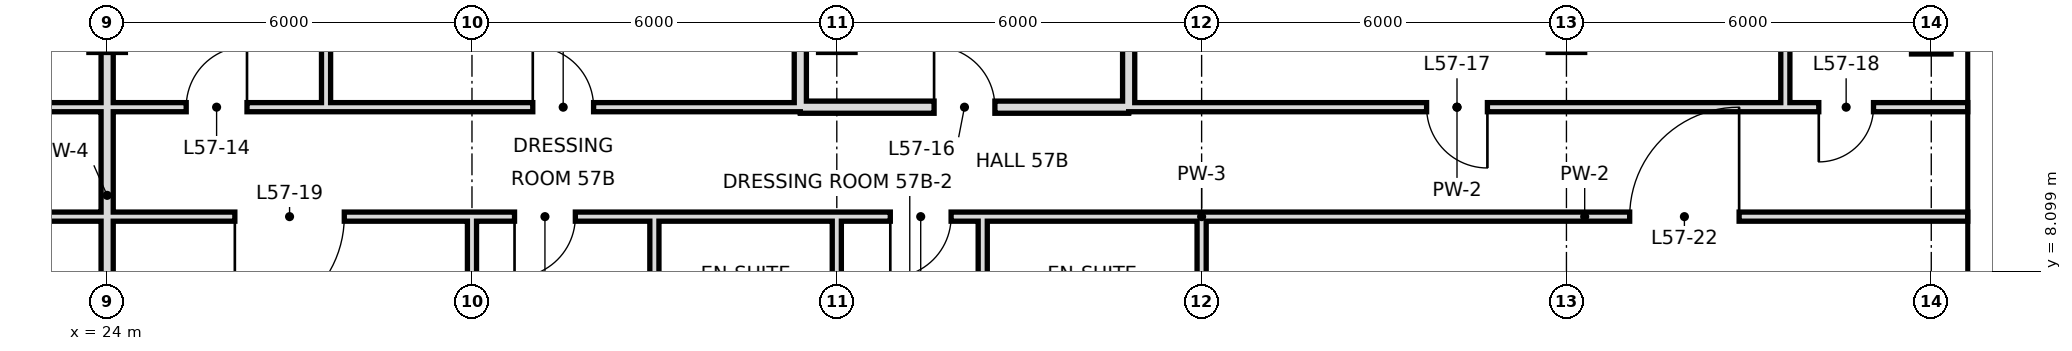
"""IFC4 building model, lengths in metres.
Left out: names, types, materials, properties, quantities, classifications, styles, units other than length and angle.
Written with IfcOpenShell. Run it as: python <this file> out.ifc"""

import sys

from ifc_helpers import new_model, si_unit, direction, frame, frame_2d, origin, origin_2d, place, context, subcontext, project, spatial, rectangle, hollow_rectangle, extrude, element, fill, save


model = new_model("IFC4")
c1 = context("Model", 3, precision=1e-05, world=origin(), true_north=direction((0.0, 1.0)))
c2 = subcontext(c1, "Body", "Model", "MODEL_VIEW")
j1 = project(units=[si_unit("LENGTHUNIT", "METRE"), si_unit("PLANEANGLEUNIT", "RADIAN")], contexts=[c1])
p1 = place(None, origin())
s1 = spatial("IfcSite", under=j1, at=p1, CompositionType="ELEMENT")
p2 = place(p1, origin())
s2 = spatial("IfcBuilding", under=s1, at=p2, CompositionType="ELEMENT")
p3 = place(p2, frame((0.0, 0.0, 243.2)))
s3 = spatial("IfcBuildingStorey", under=s2, at=p3, CompositionType="ELEMENT", Elevation=243.2)
p4 = place(p3, frame((54.0, 12.0, 0.0), z_axis=(0.0, 0.0, 1.0), x_axis=(1.0, 0.0, 0.0)))
e1 = element("IfcColumn", 1, at=p4, inside=s3, PredefinedType="COLUMN", context=c2, shape_type="SweptSolid", body=[
    extrude(hollow_rectangle(XDim=0.65, YDim=0.65, WallThickness=0.032, at=origin_2d()), origin(), (0.0, 0.0, 1.0), 3.6),
])
p5 = place(p3, frame((24.0, 0.0, 0.0), z_axis=(0.0, 0.0, 1.0), x_axis=(0.0, 1.0, 0.0)))
e2 = element("IfcWall", 2, at=p5, inside=s3, PredefinedType="SOLIDWALL", context=c2, shape_type="SweptSolid", body=[
    extrude(rectangle(XDim=18.7, YDim=0.2, at=frame_2d((9.35, 0.0))), origin(), (0.0, 0.0, 1.0), 2.72),
])
p6 = place(p3, frame((27.6, 10.8, 0.0), z_axis=(0.0, 0.0, 1.0), x_axis=(0.0, 1.0, 0.0)))
e3 = element("IfcWall", 3, at=p6, inside=s3, PredefinedType="PARTITIONING", context=c2, shape_type="SweptSolid", body=[
    extrude(rectangle(XDim=7.9, YDim=0.15, at=frame_2d((3.95, 0.0))), origin(), (0.0, 0.0, 1.0), 3.42),
])
p7 = place(p3, frame((30.0, -0.6, 0.0), z_axis=(0.0, 0.0, 1.0), x_axis=(0.0, 1.0, 0.0)))
e4 = element("IfcWall", 4, at=p7, inside=s3, PredefinedType="PARTITIONING", context=c2, shape_type="SweptSolid", body=[
    extrude(rectangle(XDim=9.6, YDim=0.15, at=frame_2d((4.8, 0.0))), origin(), (0.0, 0.0, 1.0), 2.72),
])
p8 = place(p3, frame((33.0, 6.0, 0.0), z_axis=(0.0, 0.0, 1.0), x_axis=(0.0, 1.0, 0.0)))
e5 = element("IfcWall", 5, at=p8, inside=s3, PredefinedType="PARTITIONING", context=c2, shape_type="SweptSolid", body=[
    extrude(rectangle(XDim=3.0, YDim=0.15, at=frame_2d((1.5, 0.0))), origin(), (0.0, 0.0, 1.0), 3.42),
])
p9 = place(p3, frame((35.4, 10.8, 0.0), z_axis=(0.0, 0.0, 1.0), x_axis=(0.0, 1.0, 0.0)))
e6 = element("IfcWall", 6, at=p9, inside=s3, PredefinedType="SOLIDWALL", context=c2, shape_type="SweptSolid", body=[
    extrude(rectangle(XDim=7.9, YDim=0.2, at=frame_2d((3.95, 0.0))), origin(), (0.0, 0.0, 1.0), 2.72),
])
p10 = place(p3, frame((36.0, 6.0, 0.0), z_axis=(0.0, 0.0, 1.0), x_axis=(0.0, 1.0, 0.0)))
e7 = element("IfcWall", 7, at=p10, inside=s3, PredefinedType="PARTITIONING", context=c2, shape_type="SweptSolid", body=[
    extrude(rectangle(XDim=3.0, YDim=0.15, at=frame_2d((1.5, 0.0))), origin(), (0.0, 0.0, 1.0), 2.72),
])
p11 = place(p3, frame((38.4, 6.0, 0.0), z_axis=(0.0, 0.0, 1.0), x_axis=(0.0, 1.0, 0.0)))
e8 = element("IfcWall", 8, at=p11, inside=s3, PredefinedType="PARTITIONING", context=c2, shape_type="SweptSolid", body=[
    extrude(rectangle(XDim=3.0, YDim=0.15, at=frame_2d((1.5, 0.0))), origin(), (0.0, 0.0, 1.0), 3.42),
])
p12 = place(p3, frame((40.8, 10.8, 0.0), z_axis=(0.0, 0.0, 1.0), x_axis=(0.0, 1.0, 0.0)))
e9 = element("IfcWall", 9, at=p12, inside=s3, PredefinedType="SOLIDWALL", context=c2, shape_type="SweptSolid", body=[
    extrude(rectangle(XDim=7.9, YDim=0.2, at=frame_2d((3.95, 0.0))), origin(), (0.0, 0.0, 1.0), 2.72),
])
p13 = place(p3, frame((42.0, 6.0, 0.0), z_axis=(0.0, 0.0, 1.0), x_axis=(0.0, 1.0, 0.0)))
e10 = element("IfcWall", 10, at=p13, inside=s3, PredefinedType="PARTITIONING", context=c2, shape_type="SweptSolid", body=[
    extrude(rectangle(XDim=3.0, YDim=0.15, at=frame_2d((1.5, 0.0))), origin(), (0.0, 0.0, 1.0), 2.72),
])
p14 = place(p3, frame((51.6, 10.8, 0.0), z_axis=(0.0, 0.0, 1.0), x_axis=(0.0, 1.0, 0.0)))
e11 = element("IfcWall", 11, at=p14, inside=s3, PredefinedType="PARTITIONING", context=c2, shape_type="SweptSolid", body=[
    extrude(rectangle(XDim=7.2, YDim=0.15, at=frame_2d((3.6, 0.0))), origin(), (0.0, 0.0, 1.0), 3.42),
])
p15 = place(p3, frame((35.4, 10.8, 0.0), z_axis=(0.0, 0.0, 1.0), x_axis=(1.0, 0.0, 0.0)))
e12 = element("IfcWall", 12, at=p15, inside=s3, PredefinedType="SOLIDWALL", context=c2, shape_type="SweptSolid", body=[
    extrude(rectangle(XDim=5.4, YDim=0.2, at=frame_2d((2.7, 0.0))), origin(), (0.0, 0.0, 1.0), 2.72),
])
p16 = place(p15, frame((2.2, 0.0, 0.0)))
e13 = element("IfcOpeningElement", 13, at=p16, cuts=e12, PredefinedType="OPENING", context=c2, shape_type="SweptSolid", body=[
    extrude(rectangle(XDim=1.0, YDim=2.4, at=frame_2d((0.5, 1.2))), frame((0.0, 0.11, 0.0), z_axis=(0.0, -1.0, 0.0), x_axis=(1.0, 0.0, 0.0)), (0.0, 0.0, 1.0), 0.22),
])
p17 = place(p3, frame((6.0, 10.8, 0.0), z_axis=(0.0, 0.0, 1.0), x_axis=(1.0, 0.0, 0.0)))
e14 = element("IfcWall", 14, at=p17, inside=s3, PredefinedType="PARTITIONING", context=c2, shape_type="SweptSolid", body=[
    extrude(rectangle(XDim=29.4, YDim=0.15, at=frame_2d((14.7, 0.0))), origin(), (0.0, 0.0, 1.0), 3.42),
])
p18 = place(p17, frame((3.4, 0.0, 0.0)))
e15 = element("IfcOpeningElement", 15, at=p18, cuts=e14, PredefinedType="OPENING", context=c2, shape_type="SweptSolid", body=[
    extrude(rectangle(XDim=1.0, YDim=2.4, at=frame_2d((0.5, 1.2))), frame((0.0, 0.085, 0.0), z_axis=(0.0, -1.0, 0.0), x_axis=(1.0, 0.0, 0.0)), (0.0, 0.0, 1.0), 0.17),
])
p19 = place(p17, frame((9.4, 0.0, 0.0)))
e16 = element("IfcOpeningElement", 16, at=p19, cuts=e14, PredefinedType="OPENING", context=c2, shape_type="SweptSolid", body=[
    extrude(rectangle(XDim=1.0, YDim=2.4, at=frame_2d((0.5, 1.2))), frame((0.0, 0.085, 0.0), z_axis=(0.0, -1.0, 0.0), x_axis=(1.0, 0.0, 0.0)), (0.0, 0.0, 1.0), 0.17),
])
p20 = place(p17, frame((19.3, 0.0, 0.0)))
e17 = element("IfcOpeningElement", 17, at=p20, cuts=e14, PredefinedType="OPENING", context=c2, shape_type="SweptSolid", body=[
    extrude(rectangle(XDim=1.0, YDim=2.4, at=frame_2d((0.5, 1.2))), frame((0.0, 0.085, 0.0), z_axis=(0.0, -1.0, 0.0), x_axis=(1.0, 0.0, 0.0)), (0.0, 0.0, 1.0), 0.17),
])
p21 = place(p17, frame((25.0, 0.0, 0.0)))
e18 = element("IfcOpeningElement", 18, at=p21, cuts=e14, PredefinedType="OPENING", context=c2, shape_type="SweptSolid", body=[
    extrude(rectangle(XDim=1.0, YDim=2.4, at=frame_2d((0.5, 1.2))), frame((0.0, 0.085, 0.0), z_axis=(0.0, -1.0, 0.0), x_axis=(1.0, 0.0, 0.0)), (0.0, 0.0, 1.0), 0.17),
])
p22 = place(p3, frame((40.8, 10.8, 0.0), z_axis=(0.0, 0.0, 1.0), x_axis=(1.0, 0.0, 0.0)))
e19 = element("IfcWall", 19, at=p22, inside=s3, PredefinedType="PARTITIONING", context=c2, shape_type="SweptSolid", body=[
    extrude(rectangle(XDim=10.8, YDim=0.15, at=frame_2d((5.4, 0.0))), origin(), (0.0, 0.0, 1.0), 3.42),
])
p23 = place(p22, frame((4.9, 0.0, 0.0)))
e20 = element("IfcOpeningElement", 20, at=p23, cuts=e19, PredefinedType="OPENING", context=c2, shape_type="SweptSolid", body=[
    extrude(rectangle(XDim=1.0, YDim=2.4, at=frame_2d((0.5, 1.2))), frame((0.0, 0.085, 0.0), z_axis=(0.0, -1.0, 0.0), x_axis=(1.0, 0.0, 0.0)), (0.0, 0.0, 1.0), 0.17),
])
p24 = place(p3, frame((51.6, 10.8, 0.0), z_axis=(0.0, 0.0, 1.0), x_axis=(1.0, 0.0, 0.0)))
e21 = element("IfcWall", 21, at=p24, inside=s3, PredefinedType="PARTITIONING", context=c2, shape_type="SweptSolid", body=[
    extrude(rectangle(XDim=3.0, YDim=0.15, at=frame_2d((1.5, 0.0))), origin(), (0.0, 0.0, 1.0), 3.42),
])
p25 = place(p24, frame((0.55, 0.0, 0.0)))
e22 = element("IfcOpeningElement", 22, at=p25, cuts=e21, PredefinedType="OPENING", context=c2, shape_type="SweptSolid", body=[
    extrude(rectangle(XDim=0.9, YDim=2.4, at=frame_2d((0.45, 1.2))), frame((0.0, 0.085, 0.0), z_axis=(0.0, -1.0, 0.0), x_axis=(1.0, 0.0, 0.0)), (0.0, 0.0, 1.0), 0.17),
])
p26 = place(p3, frame((0.0, 9.0, 0.0), z_axis=(0.0, 0.0, 1.0), x_axis=(1.0, 0.0, 0.0)))
e23 = element("IfcWall", 23, at=p26, inside=s3, PredefinedType="PARTITIONING", context=c2, shape_type="SweptSolid", body=[
    extrude(rectangle(XDim=33.0, YDim=0.15, at=frame_2d((16.5, 0.0))), origin(), (0.0, 0.0, 1.0), 3.42),
])
p27 = place(p26, frame((1.6, 0.0, 0.0)))
e24 = element("IfcOpeningElement", 24, at=p27, cuts=e23, PredefinedType="OPENING", context=c2, shape_type="SweptSolid", body=[
    extrude(rectangle(XDim=1.0, YDim=2.4, at=frame_2d((0.5, 1.2))), frame((0.0, 0.085, 0.0), z_axis=(0.0, -1.0, 0.0), x_axis=(1.0, 0.0, 0.0)), (0.0, 0.0, 1.0), 0.17),
])
p28 = place(p26, frame((9.4, 0.0, 0.0)))
e25 = element("IfcOpeningElement", 25, at=p28, cuts=e23, PredefinedType="OPENING", context=c2, shape_type="SweptSolid", body=[
    extrude(rectangle(XDim=1.0, YDim=2.4, at=frame_2d((0.5, 1.2))), frame((0.0, 0.085, 0.0), z_axis=(0.0, -1.0, 0.0), x_axis=(1.0, 0.0, 0.0)), (0.0, 0.0, 1.0), 0.17),
])
p29 = place(p26, frame((15.16, 0.0, 0.0)))
e26 = element("IfcOpeningElement", 26, at=p29, cuts=e23, PredefinedType="OPENING", context=c2, shape_type="SweptSolid", body=[
    extrude(rectangle(XDim=1.8, YDim=2.4, at=frame_2d((0.9, 1.2))), frame((0.0, 0.085, 0.0), z_axis=(0.0, -1.0, 0.0), x_axis=(1.0, 0.0, 0.0)), (0.0, 0.0, 1.0), 0.17),
])
p30 = place(p26, frame((26.1, 0.0, 0.0)))
e27 = element("IfcOpeningElement", 27, at=p30, cuts=e23, PredefinedType="OPENING", context=c2, shape_type="SweptSolid", body=[
    extrude(rectangle(XDim=1.8, YDim=2.4, at=frame_2d((0.9, 1.2))), frame((0.0, 0.085, 0.0), z_axis=(0.0, -1.0, 0.0), x_axis=(1.0, 0.0, 0.0)), (0.0, 0.0, 1.0), 0.17),
])
p31 = place(p26, frame((30.7, 0.0, 0.0)))
e28 = element("IfcOpeningElement", 28, at=p31, cuts=e23, PredefinedType="OPENING", context=c2, shape_type="SweptSolid", body=[
    extrude(rectangle(XDim=1.0, YDim=2.4, at=frame_2d((0.5, 1.2))), frame((0.0, 0.085, 0.0), z_axis=(0.0, -1.0, 0.0), x_axis=(1.0, 0.0, 0.0)), (0.0, 0.0, 1.0), 0.17),
])
p32 = place(p3, frame((36.0, 9.0, 0.0), z_axis=(0.0, 0.0, 1.0), x_axis=(1.0, 0.0, 0.0)))
e29 = element("IfcWall", 29, at=p32, inside=s3, PredefinedType="PARTITIONING", context=c2, shape_type="SweptSolid", body=[
    extrude(rectangle(XDim=2.4, YDim=0.15, at=frame_2d((1.2, 0.0))), origin(), (0.0, 0.0, 1.0), 3.42),
])
p33 = place(p32, frame((0.88, 0.0, 0.0)))
e30 = element("IfcOpeningElement", 30, at=p33, cuts=e29, PredefinedType="OPENING", context=c2, shape_type="SweptSolid", body=[
    extrude(rectangle(XDim=1.0, YDim=2.4, at=frame_2d((0.5, 1.2))), frame((0.0, 0.085, 0.0), z_axis=(0.0, -1.0, 0.0), x_axis=(1.0, 0.0, 0.0)), (0.0, 0.0, 1.0), 0.17),
])
p34 = place(p3, frame((42.0, 9.0, 0.0), z_axis=(0.0, 0.0, 1.0), x_axis=(1.0, 0.0, 0.0)))
e31 = element("IfcWall", 31, at=p34, inside=s3, PredefinedType="PARTITIONING", context=c2, shape_type="SweptSolid", body=[
    extrude(rectangle(XDim=12.6, YDim=0.15, at=frame_2d((6.3, 0.0))), origin(), (0.0, 0.0, 1.0), 3.42),
])
p35 = place(p34, frame((7.04, 0.0, 0.0)))
e32 = element("IfcOpeningElement", 32, at=p35, cuts=e31, PredefinedType="OPENING", context=c2, shape_type="SweptSolid", body=[
    extrude(rectangle(XDim=1.8, YDim=2.4, at=frame_2d((0.9, 1.2))), frame((0.0, 0.085, 0.0), z_axis=(0.0, -1.0, 0.0), x_axis=(1.0, 0.0, 0.0)), (0.0, 0.0, 1.0), 0.17),
])
p36 = place(p3, frame((33.0, 9.0, 0.0), z_axis=(0.0, 0.0, 1.0), x_axis=(1.0, 0.0, 0.0)))
e33 = element("IfcWall", 33, at=p36, inside=s3, PredefinedType="PARTITIONING", context=c2, shape_type="SweptSolid", body=[
    extrude(rectangle(XDim=3.0, YDim=0.15, at=frame_2d((1.5, 0.0))), origin(), (0.0, 0.0, 1.0), 3.42),
])
p37 = place(p3, frame((38.4, 9.0, 0.0), z_axis=(0.0, 0.0, 1.0), x_axis=(1.0, 0.0, 0.0)))
e34 = element("IfcWall", 34, at=p37, inside=s3, PredefinedType="PARTITIONING", context=c2, shape_type="SweptSolid", body=[
    extrude(rectangle(XDim=3.6, YDim=0.15, at=frame_2d((1.8, 0.0))), origin(), (0.0, 0.0, 1.0), 3.42),
])
p38 = place(p20, frame((1.0, 0.0, 0.0), z_axis=(0.0, 0.0, 1.0), x_axis=(-1.0, 0.0, 0.0)))
e35 = element("IfcDoor", 35, at=p38, inside=s3, OperationType="SINGLE_SWING_LEFT", PredefinedType="DOOR", context=c2, shape_type="SweptSolid", body=[
    extrude(rectangle(XDim=1.0, YDim=2.4, at=frame_2d((0.5, 1.2))), frame((0.0, 0.025, 0.0), z_axis=(0.0, -1.0, 0.0), x_axis=(1.0, 0.0, 0.0)), (0.0, 0.0, 1.0), 0.05),
])
fill(e17, e35)
p39 = place(p21, origin())
e36 = element("IfcDoor", 36, at=p39, inside=s3, OperationType="SINGLE_SWING_LEFT", PredefinedType="DOOR", context=c2, shape_type="SweptSolid", body=[
    extrude(rectangle(XDim=1.0, YDim=2.4, at=frame_2d((0.5, 1.2))), frame((0.0, 0.025, 0.0), z_axis=(0.0, -1.0, 0.0), x_axis=(1.0, 0.0, 0.0)), (0.0, 0.0, 1.0), 0.05),
])
fill(e18, e36)
p40 = place(p16, origin())
e37 = element("IfcDoor", 37, at=p40, inside=s3, OperationType="SINGLE_SWING_LEFT", PredefinedType="DOOR", context=c2, shape_type="SweptSolid", body=[
    extrude(rectangle(XDim=1.0, YDim=2.4, at=frame_2d((0.5, 1.2))), frame((0.0, 0.025, 0.0), z_axis=(0.0, -1.0, 0.0), x_axis=(1.0, 0.0, 0.0)), (0.0, 0.0, 1.0), 0.05),
])
fill(e13, e37)
p41 = place(p23, origin())
e38 = element("IfcDoor", 38, at=p41, inside=s3, OperationType="SINGLE_SWING_RIGHT", PredefinedType="DOOR", context=c2, shape_type="SweptSolid", body=[
    extrude(rectangle(XDim=1.0, YDim=2.4, at=frame_2d((0.5, 1.2))), frame((0.0, 0.025, 0.0), z_axis=(0.0, -1.0, 0.0), x_axis=(1.0, 0.0, 0.0)), (0.0, 0.0, 1.0), 0.05),
])
fill(e20, e38)
p42 = place(p25, frame((0.9, 0.0, 0.0), z_axis=(0.0, 0.0, 1.0), x_axis=(-1.0, 0.0, 0.0)))
e39 = element("IfcDoor", 39, at=p42, inside=s3, OperationType="SINGLE_SWING_RIGHT", PredefinedType="DOOR", context=c2, shape_type="SweptSolid", body=[
    extrude(rectangle(XDim=0.9, YDim=2.4, at=frame_2d((0.45, 1.2))), frame((0.0, 0.025, 0.0), z_axis=(0.0, -1.0, 0.0), x_axis=(1.0, 0.0, 0.0)), (0.0, 0.0, 1.0), 0.05),
])
fill(e22, e39)
p43 = place(p30, frame((1.8, 0.0, 0.0), z_axis=(0.0, 0.0, 1.0), x_axis=(-1.0, 0.0, 0.0)))
e40 = element("IfcDoor", 40, at=p43, inside=s3, OperationType="SINGLE_SWING_RIGHT", PredefinedType="DOOR", context=c2, shape_type="SweptSolid", body=[
    extrude(rectangle(XDim=1.8, YDim=2.4, at=frame_2d((0.9, 1.2))), frame((0.0, 0.025, 0.0), z_axis=(0.0, -1.0, 0.0), x_axis=(1.0, 0.0, 0.0)), (0.0, 0.0, 1.0), 0.05),
])
fill(e27, e40)
p44 = place(p31, frame((1.0, 0.0, 0.0), z_axis=(0.0, 0.0, 1.0), x_axis=(-1.0, 0.0, 0.0)))
e41 = element("IfcDoor", 41, at=p44, inside=s3, OperationType="SINGLE_SWING_RIGHT", PredefinedType="DOOR", context=c2, shape_type="SweptSolid", body=[
    extrude(rectangle(XDim=1.0, YDim=2.4, at=frame_2d((0.5, 1.2))), frame((0.0, 0.025, 0.0), z_axis=(0.0, -1.0, 0.0), x_axis=(1.0, 0.0, 0.0)), (0.0, 0.0, 1.0), 0.05),
])
fill(e28, e41)
p45 = place(p33, frame((1.0, 0.0, 0.0), z_axis=(0.0, 0.0, 1.0), x_axis=(-1.0, 0.0, 0.0)))
e42 = element("IfcDoor", 42, at=p45, inside=s3, OperationType="SINGLE_SWING_RIGHT", PredefinedType="DOOR", context=c2, shape_type="SweptSolid", body=[
    extrude(rectangle(XDim=1.0, YDim=2.4, at=frame_2d((0.5, 1.2))), frame((0.0, 0.025, 0.0), z_axis=(0.0, -1.0, 0.0), x_axis=(1.0, 0.0, 0.0)), (0.0, 0.0, 1.0), 0.05),
])
fill(e30, e42)
p46 = place(p35, frame((1.8, 0.0, 0.0), z_axis=(0.0, 0.0, 1.0), x_axis=(-1.0, 0.0, 0.0)))
e43 = element("IfcDoor", 43, at=p46, inside=s3, OperationType="SINGLE_SWING_LEFT", PredefinedType="DOOR", context=c2, shape_type="SweptSolid", body=[
    extrude(rectangle(XDim=1.8, YDim=2.4, at=frame_2d((0.9, 1.2))), frame((0.0, 0.025, 0.0), z_axis=(0.0, -1.0, 0.0), x_axis=(1.0, 0.0, 0.0)), (0.0, 0.0, 1.0), 0.05),
])
fill(e32, e43)
save(model, sys.argv[1])
